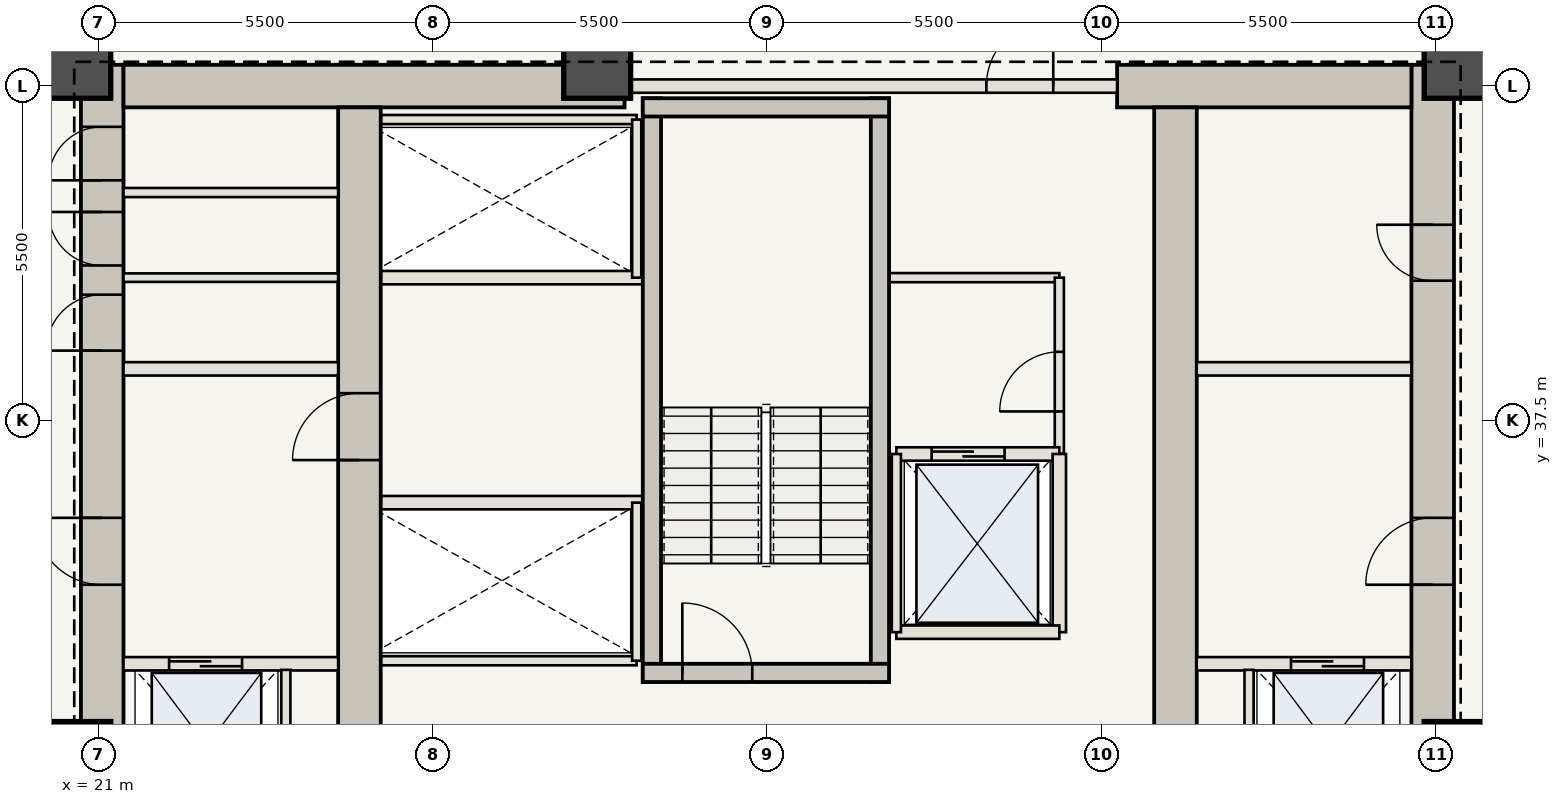
"""IFC4 building model, lengths in metres.
Left out: names, types, materials, properties, quantities, classifications, styles, units other than length and angle.
Written with IfcOpenShell. Run it as: python <this file> out.ifc"""

import sys

from ifc_helpers import new_model, si_unit, direction, frame, frame_2d, origin, origin_2d, place, context, subcontext, project, spatial, rectangle, extrude, element, fill, save


model = new_model("IFC4")
c1 = context("Model", 3, precision=1e-05, world=origin(), true_north=direction((0.0, 1.0)))
c2 = subcontext(c1, "Body", "Model", "MODEL_VIEW")
j1 = project(units=[si_unit("LENGTHUNIT", "METRE"), si_unit("PLANEANGLEUNIT", "RADIAN")], contexts=[c1])
p1 = place(None, origin())
s1 = spatial("IfcSite", under=j1, at=p1, CompositionType="ELEMENT")
p2 = place(p1, origin())
s2 = spatial("IfcBuilding", under=s1, at=p2, CompositionType="ELEMENT")
p3 = place(p2, frame((0.0, 0.0, 66.85)))
s3 = spatial("IfcBuildingStorey", under=s2, at=p3, CompositionType="ELEMENT", Elevation=66.85)
p4 = place(p3, frame((21.06, 30.6, 0.0), z_axis=(0.0, 0.0, 1.0), x_axis=(0.0, 1.0, 0.0)))
e1 = element("IfcWall", 1, at=p4, inside=s3, PredefinedType="SHEAR", context=c2, shape_type="SweptSolid", body=[
    extrude(rectangle(XDim=12.75, YDim=0.7, at=frame_2d((6.375, 0.0))), origin(), (0.0, 0.0, 1.0), 3.5),
])
p5 = place(p4, frame((4.2, 0.0, 0.0)))
e2 = element("IfcOpeningElement", 2, at=p5, cuts=e1, PredefinedType="OPENING", context=c2, shape_type="SweptSolid", body=[
    extrude(rectangle(XDim=1.1, YDim=2.15, at=frame_2d((0.55, 1.075))), frame((0.0, 0.36, 0.0), z_axis=(0.0, -1.0, 0.0), x_axis=(1.0, 0.0, 0.0)), (0.0, 0.0, 1.0), 0.72),
])
p6 = place(p4, frame((8.05, 0.0, 0.0)))
e3 = element("IfcOpeningElement", 3, at=p6, cuts=e1, PredefinedType="OPENING", context=c2, shape_type="SweptSolid", body=[
    extrude(rectangle(XDim=0.92, YDim=2.1, at=frame_2d((0.46, 1.05))), frame((0.0, 0.36, 0.0), z_axis=(0.0, -1.0, 0.0), x_axis=(1.0, 0.0, 0.0)), (0.0, 0.0, 1.0), 0.72),
])
p7 = place(p4, frame((9.45, 0.0, 0.0)))
e4 = element("IfcOpeningElement", 4, at=p7, cuts=e1, PredefinedType="OPENING", context=c2, shape_type="SweptSolid", body=[
    extrude(rectangle(XDim=0.88, YDim=2.1, at=frame_2d((0.44, 1.05))), frame((0.0, 0.36, 0.0), z_axis=(0.0, -1.0, 0.0), x_axis=(1.0, 0.0, 0.0)), (0.0, 0.0, 1.0), 0.72),
])
p8 = place(p4, frame((10.85, 0.0, 0.0)))
e5 = element("IfcOpeningElement", 5, at=p8, cuts=e1, PredefinedType="OPENING", context=c2, shape_type="SweptSolid", body=[
    extrude(rectangle(XDim=0.88, YDim=2.1, at=frame_2d((0.44, 1.05))), frame((0.0, 0.36, 0.0), z_axis=(0.0, -1.0, 0.0), x_axis=(1.0, 0.0, 0.0)), (0.0, 0.0, 1.0), 0.72),
])
p9 = place(p3, frame((42.94, 30.6, 0.0), z_axis=(0.0, 0.0, 1.0), x_axis=(0.0, 1.0, 0.0)))
e6 = element("IfcWall", 6, at=p9, inside=s3, PredefinedType="SHEAR", context=c2, shape_type="SweptSolid", body=[
    extrude(rectangle(XDim=12.75, YDim=0.7, at=frame_2d((6.375, 0.0))), origin(), (0.0, 0.0, 1.0), 3.5),
])
p10 = place(p9, frame((4.2, 0.0, 0.0)))
e7 = element("IfcOpeningElement", 7, at=p10, cuts=e6, PredefinedType="OPENING", context=c2, shape_type="SweptSolid", body=[
    extrude(rectangle(XDim=1.1, YDim=2.15, at=frame_2d((0.55, 1.075))), frame((0.0, 0.36, 0.0), z_axis=(0.0, -1.0, 0.0), x_axis=(1.0, 0.0, 0.0)), (0.0, 0.0, 1.0), 0.72),
])
p11 = place(p9, frame((9.2, 0.0, 0.0)))
e8 = element("IfcOpeningElement", 8, at=p11, cuts=e6, PredefinedType="OPENING", context=c2, shape_type="SweptSolid", body=[
    extrude(rectangle(XDim=0.92, YDim=2.1, at=frame_2d((0.46, 1.05))), frame((0.0, 0.36, 0.0), z_axis=(0.0, -1.0, 0.0), x_axis=(1.0, 0.0, 0.0)), (0.0, 0.0, 1.0), 0.72),
])
p12 = place(p3, frame((21.41, 43.0, 0.0), z_axis=(0.0, 0.0, 1.0), x_axis=(1.0, 0.0, 0.0)))
e9 = element("IfcWall", 9, at=p12, inside=s3, PredefinedType="SHEAR", context=c2, shape_type="SweptSolid", body=[
    extrude(rectangle(XDim=8.24, YDim=0.7, at=frame_2d((4.12, 0.0))), origin(), (0.0, 0.0, 1.0), 3.5),
])
p13 = place(p3, frame((37.75, 43.0, 0.0), z_axis=(0.0, 0.0, 1.0), x_axis=(1.0, 0.0, 0.0)))
e10 = element("IfcWall", 10, at=p13, inside=s3, PredefinedType="SHEAR", context=c2, shape_type="SweptSolid", body=[
    extrude(rectangle(XDim=4.84, YDim=0.7, at=frame_2d((2.42, 0.0))), origin(), (0.0, 0.0, 1.0), 3.5),
])
p14 = place(p3, frame((25.29, 30.6, 0.0), z_axis=(0.0, 0.0, 1.0), x_axis=(0.0, 1.0, 0.0)))
e11 = element("IfcWall", 11, at=p14, inside=s3, PredefinedType="SHEAR", context=c2, shape_type="SweptSolid", body=[
    extrude(rectangle(XDim=12.05, YDim=0.7, at=frame_2d((6.025, 0.0))), origin(), (0.0, 0.0, 1.0), 3.5),
])
p15 = place(p14, frame((6.25, 0.0, 0.0)))
e12 = element("IfcOpeningElement", 12, at=p15, cuts=e11, PredefinedType="OPENING", context=c2, shape_type="SweptSolid", body=[
    extrude(rectangle(XDim=1.1, YDim=2.15, at=frame_2d((0.55, 1.075))), frame((0.0, 0.36, 0.0), z_axis=(0.0, -1.0, 0.0), x_axis=(1.0, 0.0, 0.0)), (0.0, 0.0, 1.0), 0.72),
])
p16 = place(p3, frame((38.71, 30.6, 0.0), z_axis=(0.0, 0.0, 1.0), x_axis=(0.0, 1.0, 0.0)))
e13 = element("IfcWall", 13, at=p16, inside=s3, PredefinedType="SHEAR", context=c2, shape_type="SweptSolid", body=[
    extrude(rectangle(XDim=12.05, YDim=0.7, at=frame_2d((6.025, 0.0))), origin(), (0.0, 0.0, 1.0), 3.5),
])
for number, where, z_axis, x_axis in (
    (14, (43.35, 32.0, 0.0), (0.0, 0.0, 1.0), (1.0, 0.0, 0.0)),
    (15, (43.35, 43.35, 0.0), (0.0, 0.0, 1.0), (1.0, 0.0, 0.0)),
    (16, (29.2, 43.35, 0.0), (0.0, 0.0, 1.0), (1.0, 0.0, 0.0)),
    (17, (20.65, 43.35, 0.0), (0.0, 0.0, 1.0), (1.0, 0.0, 0.0)),
    (18, (20.65, 32.0, 0.0), (0.0, 0.0, 1.0), (1.0, 0.0, 0.0)),
):
    element("IfcColumn", number, at=place(p3, frame(where, z_axis=z_axis, x_axis=x_axis)), inside=s3, PredefinedType="COLUMN", context=c2, shape_type="SweptSolid", body=[
        extrude(rectangle(XDim=1.1, YDim=1.1, at=origin_2d()), origin(), (0.0, 0.0, 1.0), 3.5),
    ])
p17 = place(p3, frame((21.41, 33.5, 0.0), z_axis=(0.0, 0.0, 1.0), x_axis=(1.0, 0.0, 0.0)))
e19 = element("IfcWall", 19, at=p17, inside=s3, PredefinedType="STANDARD", context=c2, shape_type="SweptSolid", body=[
    extrude(rectangle(XDim=3.53, YDim=0.22, at=frame_2d((1.765, 0.0))), origin(), (0.0, 0.0, 1.0), 3.32),
])
p18 = place(p17, frame((0.75, 0.0, 0.0)))
e20 = element("IfcOpeningElement", 20, at=p18, cuts=e19, PredefinedType="OPENING", context=c2, shape_type="SweptSolid", body=[
    extrude(rectangle(XDim=1.2, YDim=2.2, at=frame_2d((0.6, 1.1))), frame((0.0, 0.12, 0.0), z_axis=(0.0, -1.0, 0.0), x_axis=(1.0, 0.0, 0.0)), (0.0, 0.0, 1.0), 0.24),
])
p19 = place(p3, frame((24.08, 30.75, 0.0), z_axis=(0.0, 0.0, 1.0), x_axis=(0.0, 1.0, 0.0)))
e21 = element("IfcWall", 21, at=p19, inside=s3, PredefinedType="STANDARD", context=c2, shape_type="SweptSolid", body=[
    extrude(rectangle(XDim=2.65, YDim=0.15, at=frame_2d((1.325, 0.0))), origin(), (0.0, 0.0, 1.0), 3.32),
])
p20 = place(p3, frame((39.06, 33.5, 0.0), z_axis=(0.0, 0.0, 1.0), x_axis=(1.0, 0.0, 0.0)))
e22 = element("IfcWall", 22, at=p20, inside=s3, PredefinedType="STANDARD", context=c2, shape_type="SweptSolid", body=[
    extrude(rectangle(XDim=3.53, YDim=0.22, at=frame_2d((1.765, 0.0))), origin(), (0.0, 0.0, 1.0), 3.32),
])
p21 = place(p20, frame((1.55, 0.0, 0.0)))
e23 = element("IfcOpeningElement", 23, at=p21, cuts=e22, PredefinedType="OPENING", context=c2, shape_type="SweptSolid", body=[
    extrude(rectangle(XDim=1.2, YDim=2.2, at=frame_2d((0.6, 1.1))), frame((0.0, 0.12, 0.0), z_axis=(0.0, -1.0, 0.0), x_axis=(1.0, 0.0, 0.0)), (0.0, 0.0, 1.0), 0.24),
])
p22 = place(p3, frame((39.92, 30.75, 0.0), z_axis=(0.0, 0.0, 1.0), x_axis=(0.0, 1.0, 0.0)))
e24 = element("IfcWall", 24, at=p22, inside=s3, PredefinedType="STANDARD", context=c2, shape_type="SweptSolid", body=[
    extrude(rectangle(XDim=2.65, YDim=0.15, at=frame_2d((1.325, 0.0))), origin(), (0.0, 0.0, 1.0), 3.32),
])
for number, where, z_axis, x_axis in (
    (25, (21.41, 38.35, 0.0), (0.0, 0.0, 1.0), (1.0, 0.0, 0.0)),
    (26, (39.06, 38.35, 0.0), (0.0, 0.0, 1.0), (1.0, 0.0, 0.0)),
):
    element("IfcWall", number, at=place(p3, frame(where, z_axis=z_axis, x_axis=x_axis)), inside=s3, PredefinedType="STANDARD", context=c2, shape_type="SweptSolid", body=[
        extrude(rectangle(XDim=3.53, YDim=0.22, at=frame_2d((1.765, 0.0))), origin(), (0.0, 0.0, 1.0), 3.32),
    ])
p23 = place(p3, frame((21.41, 39.85, 0.0), z_axis=(0.0, 0.0, 1.0), x_axis=(1.0, 0.0, 0.0)))
e27 = element("IfcWall", 27, at=p23, inside=s3, PredefinedType="STANDARD", context=c2, shape_type="SweptSolid", body=[
    extrude(rectangle(XDim=3.53, YDim=0.14, at=frame_2d((1.765, 0.0))), origin(), (0.0, 0.0, 1.0), 3.32),
])
p24 = place(p3, frame((21.41, 41.25, 0.0), z_axis=(0.0, 0.0, 1.0), x_axis=(1.0, 0.0, 0.0)))
e28 = element("IfcWall", 28, at=p24, inside=s3, PredefinedType="STANDARD", context=c2, shape_type="SweptSolid", body=[
    extrude(rectangle(XDim=3.53, YDim=0.15, at=frame_2d((1.765, 0.0))), origin(), (0.0, 0.0, 1.0), 3.32),
])
p25 = place(p3, frame((34.0, 39.85, 0.0), z_axis=(0.0, 0.0, 1.0), x_axis=(1.0, 0.0, 0.0)))
e29 = element("IfcWall", 29, at=p25, inside=s3, PredefinedType="STANDARD", context=c2, shape_type="SweptSolid", body=[
    extrude(rectangle(XDim=2.8, YDim=0.15, at=frame_2d((1.4, 0.0))), origin(), (0.0, 0.0, 1.0), 3.32),
])
p26 = place(p3, frame((36.8, 36.95, 0.0), z_axis=(0.0, 0.0, 1.0), x_axis=(0.0, 1.0, 0.0)))
e30 = element("IfcWall", 30, at=p26, inside=s3, PredefinedType="STANDARD", context=c2, shape_type="SweptSolid", body=[
    extrude(rectangle(XDim=2.9, YDim=0.15, at=frame_2d((1.45, 0.0))), origin(), (0.0, 0.0, 1.0), 3.32),
])
p27 = place(p26, frame((0.7, 0.0, 0.0)))
e31 = element("IfcOpeningElement", 31, at=p27, cuts=e30, PredefinedType="OPENING", context=c2, shape_type="SweptSolid", body=[
    extrude(rectangle(XDim=0.98, YDim=2.2, at=frame_2d((0.49, 1.1))), frame((0.0, 0.085, 0.0), z_axis=(0.0, -1.0, 0.0), x_axis=(1.0, 0.0, 0.0)), (0.0, 0.0, 1.0), 0.17),
])
p28 = place(p3, frame((25.65, 36.15, 0.0), z_axis=(0.0, 0.0, 1.0), x_axis=(1.0, 0.0, 0.0)))
e32 = element("IfcWall", 32, at=p28, inside=s3, PredefinedType="STANDARD", context=c2, shape_type="SweptSolid", body=[
    extrude(rectangle(XDim=4.3, YDim=0.22, at=frame_2d((2.15, 0.0))), origin(), (0.0, 0.0, 1.0), 3.32),
])
p29 = place(p3, frame((25.65, 33.55, 0.0), z_axis=(0.0, 0.0, 1.0), x_axis=(1.0, 0.0, 0.0)))
e33 = element("IfcWall", 33, at=p29, inside=s3, PredefinedType="STANDARD", context=c2, shape_type="SweptSolid", body=[
    extrude(rectangle(XDim=4.2, YDim=0.15, at=frame_2d((2.1, 0.0))), origin(), (0.0, 0.0, 1.0), 3.32),
])
p30 = place(p3, frame((29.85, 33.55, 0.0), z_axis=(0.0, 0.0, 1.0), x_axis=(0.0, 1.0, 0.0)))
e34 = element("IfcWall", 34, at=p30, inside=s3, PredefinedType="STANDARD", context=c2, shape_type="SweptSolid", body=[
    extrude(rectangle(XDim=2.6, YDim=0.15, at=frame_2d((1.3, 0.0))), origin(), (0.0, 0.0, 1.0), 3.32),
])
p31 = place(p3, frame((25.65, 39.85, 0.0), z_axis=(0.0, 0.0, 1.0), x_axis=(1.0, 0.0, 0.0)))
e35 = element("IfcWall", 35, at=p31, inside=s3, PredefinedType="STANDARD", context=c2, shape_type="SweptSolid", body=[
    extrude(rectangle(XDim=4.3, YDim=0.22, at=frame_2d((2.15, 0.0))), origin(), (0.0, 0.0, 1.0), 3.32),
])
p32 = place(p3, frame((25.65, 42.45, 0.0), z_axis=(0.0, 0.0, 1.0), x_axis=(1.0, 0.0, 0.0)))
e36 = element("IfcWall", 36, at=p32, inside=s3, PredefinedType="STANDARD", context=c2, shape_type="SweptSolid", body=[
    extrude(rectangle(XDim=4.2, YDim=0.15, at=frame_2d((2.1, 0.0))), origin(), (0.0, 0.0, 1.0), 3.32),
])
p33 = place(p3, frame((29.85, 39.85, 0.0), z_axis=(0.0, 0.0, 1.0), x_axis=(0.0, 1.0, 0.0)))
e37 = element("IfcWall", 37, at=p33, inside=s3, PredefinedType="STANDARD", context=c2, shape_type="SweptSolid", body=[
    extrude(rectangle(XDim=2.6, YDim=0.15, at=frame_2d((1.3, 0.0))), origin(), (0.0, 0.0, 1.0), 3.32),
])
for number, where, z_axis, x_axis in (
    (38, (30.1, 33.2, 0.0), (0.0, 0.0, 1.0), (0.0, 1.0, 0.0)),
    (39, (33.85, 33.2, 0.0), (0.0, 0.0, 1.0), (0.0, 1.0, 0.0)),
):
    element("IfcWall", number, at=place(p3, frame(where, z_axis=z_axis, x_axis=x_axis)), inside=s3, PredefinedType="SHEAR", context=c2, shape_type="SweptSolid", body=[
        extrude(rectangle(XDim=9.6, YDim=0.3, at=frame_2d((4.8, 0.0))), origin(), (0.0, 0.0, 1.0), 3.32),
    ])
p34 = place(p3, frame((29.95, 33.35, 0.0), z_axis=(0.0, 0.0, 1.0), x_axis=(1.0, 0.0, 0.0)))
e40 = element("IfcWall", 40, at=p34, inside=s3, PredefinedType="SHEAR", context=c2, shape_type="SweptSolid", body=[
    extrude(rectangle(XDim=4.05, YDim=0.3, at=frame_2d((2.025, 0.0))), origin(), (0.0, 0.0, 1.0), 3.32),
])
p35 = place(p34, frame((0.65, 0.0, 0.0)))
e41 = element("IfcOpeningElement", 41, at=p35, cuts=e40, PredefinedType="OPENING", context=c2, shape_type="SweptSolid", body=[
    extrude(rectangle(XDim=1.15, YDim=2.15, at=frame_2d((0.575, 1.075))), frame((0.0, 0.16, 0.0), z_axis=(0.0, -1.0, 0.0), x_axis=(1.0, 0.0, 0.0)), (0.0, 0.0, 1.0), 0.32),
])
p36 = place(p3, frame((29.95, 42.65, 0.0), z_axis=(0.0, 0.0, 1.0), x_axis=(1.0, 0.0, 0.0)))
e42 = element("IfcWall", 42, at=p36, inside=s3, PredefinedType="SHEAR", context=c2, shape_type="SweptSolid", body=[
    extrude(rectangle(XDim=4.05, YDim=0.3, at=frame_2d((2.025, 0.0))), origin(), (0.0, 0.0, 1.0), 3.32),
])
p37 = place(p3, frame((29.65, 43.0, 0.0), z_axis=(0.0, 0.0, 1.0), x_axis=(1.0, 0.0, 0.0)))
e43 = element("IfcWall", 43, at=p37, inside=s3, PredefinedType="STANDARD", context=c2, shape_type="SweptSolid", body=[
    extrude(rectangle(XDim=8.1, YDim=0.22, at=frame_2d((4.05, 0.0))), origin(), (0.0, 0.0, 1.0), 3.32),
])
p38 = place(p37, frame((5.95, 0.0, 0.0)))
e44 = element("IfcOpeningElement", 44, at=p38, cuts=e43, PredefinedType="OPENING", context=c2, shape_type="SweptSolid", body=[
    extrude(rectangle(XDim=1.1, YDim=2.15, at=frame_2d((0.55, 1.075))), frame((0.0, 0.12, 0.0), z_axis=(0.0, -1.0, 0.0), x_axis=(1.0, 0.0, 0.0)), (0.0, 0.0, 1.0), 0.24),
])
p39 = place(p3, frame((34.12, 36.95, 0.0), z_axis=(0.0, 0.0, 1.0), x_axis=(1.0, 0.0, 0.0)))
e45 = element("IfcWall", 45, at=p39, inside=s3, PredefinedType="STANDARD", context=c2, shape_type="SweptSolid", body=[
    extrude(rectangle(XDim=2.68, YDim=0.22, at=frame_2d((1.34, 0.0))), origin(), (0.0, 0.0, 1.0), 3.32),
])
p40 = place(p39, frame((0.58, 0.0, 0.0)))
e46 = element("IfcOpeningElement", 46, at=p40, cuts=e45, PredefinedType="OPENING", context=c2, shape_type="SweptSolid", body=[
    extrude(rectangle(XDim=1.2, YDim=2.2, at=frame_2d((0.6, 1.1))), frame((0.0, 0.12, 0.0), z_axis=(0.0, -1.0, 0.0), x_axis=(1.0, 0.0, 0.0)), (0.0, 0.0, 1.0), 0.24),
])
p41 = place(p3, frame((36.8, 34.02, 0.0), z_axis=(0.0, 0.0, 1.0), x_axis=(0.0, 1.0, 0.0)))
e47 = element("IfcWall", 47, at=p41, inside=s3, PredefinedType="STANDARD", context=c2, shape_type="SweptSolid", body=[
    extrude(rectangle(XDim=2.93, YDim=0.22, at=frame_2d((1.465, 0.0))), origin(), (0.0, 0.0, 1.0), 3.32),
])
p42 = place(p3, frame((34.12, 34.02, 0.0), z_axis=(0.0, 0.0, 1.0), x_axis=(1.0, 0.0, 0.0)))
e48 = element("IfcWall", 48, at=p42, inside=s3, PredefinedType="STANDARD", context=c2, shape_type="SweptSolid", body=[
    extrude(rectangle(XDim=2.68, YDim=0.22, at=frame_2d((1.34, 0.0))), origin(), (0.0, 0.0, 1.0), 3.32),
])
p43 = place(p3, frame((34.12, 34.02, 0.0), z_axis=(0.0, 0.0, 1.0), x_axis=(0.0, 1.0, 0.0)))
e49 = element("IfcWall", 49, at=p43, inside=s3, PredefinedType="STANDARD", context=c2, shape_type="SweptSolid", body=[
    extrude(rectangle(XDim=2.93, YDim=0.15, at=frame_2d((1.465, 0.0))), origin(), (0.0, 0.0, 1.0), 3.32),
])
p44 = place(p5, origin())
e50 = element("IfcDoor", 50, at=p44, inside=s3, OperationType="SINGLE_SWING_RIGHT", PredefinedType="DOOR", context=c2, shape_type="SweptSolid", body=[
    extrude(rectangle(XDim=1.1, YDim=2.15, at=frame_2d((0.55, 1.075))), frame((0.0, 0.025, 0.0), z_axis=(0.0, -1.0, 0.0), x_axis=(1.0, 0.0, 0.0)), (0.0, 0.0, 1.0), 0.05),
])
fill(e2, e50)
p45 = place(p10, origin())
e51 = element("IfcDoor", 51, at=p45, inside=s3, OperationType="SINGLE_SWING_LEFT", PredefinedType="DOOR", context=c2, shape_type="SweptSolid", body=[
    extrude(rectangle(XDim=1.1, YDim=2.15, at=frame_2d((0.55, 1.075))), frame((0.0, 0.025, 0.0), z_axis=(0.0, -1.0, 0.0), x_axis=(1.0, 0.0, 0.0)), (0.0, 0.0, 1.0), 0.05),
])
fill(e7, e51)
p46 = place(p15, origin())
e52 = element("IfcDoor", 52, at=p46, inside=s3, OperationType="SINGLE_SWING_LEFT", PredefinedType="DOOR", context=c2, shape_type="SweptSolid", body=[
    extrude(rectangle(XDim=1.1, YDim=2.15, at=frame_2d((0.55, 1.075))), frame((0.0, 0.025, 0.0), z_axis=(0.0, -1.0, 0.0), x_axis=(1.0, 0.0, 0.0)), (0.0, 0.0, 1.0), 0.05),
])
fill(e12, e52)
p47 = place(p6, origin())
e53 = element("IfcDoor", 53, at=p47, inside=s3, OperationType="SINGLE_SWING_LEFT", PredefinedType="DOOR", context=c2, shape_type="SweptSolid", body=[
    extrude(rectangle(XDim=0.92, YDim=2.1, at=frame_2d((0.46, 1.05))), frame((0.0, 0.025, 0.0), z_axis=(0.0, -1.0, 0.0), x_axis=(1.0, 0.0, 0.0)), (0.0, 0.0, 1.0), 0.05),
])
fill(e3, e53)
p48 = place(p7, origin())
e54 = element("IfcDoor", 54, at=p48, inside=s3, OperationType="SINGLE_SWING_RIGHT", PredefinedType="DOOR", context=c2, shape_type="SweptSolid", body=[
    extrude(rectangle(XDim=0.88, YDim=2.1, at=frame_2d((0.44, 1.05))), frame((0.0, 0.025, 0.0), z_axis=(0.0, -1.0, 0.0), x_axis=(1.0, 0.0, 0.0)), (0.0, 0.0, 1.0), 0.05),
])
fill(e4, e54)
p49 = place(p8, origin())
e55 = element("IfcDoor", 55, at=p49, inside=s3, OperationType="SINGLE_SWING_LEFT", PredefinedType="DOOR", context=c2, shape_type="SweptSolid", body=[
    extrude(rectangle(XDim=0.88, YDim=2.1, at=frame_2d((0.44, 1.05))), frame((0.0, 0.025, 0.0), z_axis=(0.0, -1.0, 0.0), x_axis=(1.0, 0.0, 0.0)), (0.0, 0.0, 1.0), 0.05),
])
fill(e5, e55)
p50 = place(p11, origin())
e56 = element("IfcDoor", 56, at=p50, inside=s3, OperationType="SINGLE_SWING_RIGHT", PredefinedType="DOOR", context=c2, shape_type="SweptSolid", body=[
    extrude(rectangle(XDim=0.92, YDim=2.1, at=frame_2d((0.46, 1.05))), frame((0.0, 0.025, 0.0), z_axis=(0.0, -1.0, 0.0), x_axis=(1.0, 0.0, 0.0)), (0.0, 0.0, 1.0), 0.05),
])
fill(e8, e56)
p51 = place(p18, origin())
e57 = element("IfcDoor", 57, at=p51, inside=s3, OperationType="DOUBLE_DOOR_SLIDING", PredefinedType="DOOR", context=c2, shape_type="SweptSolid", body=[
    extrude(rectangle(XDim=1.2, YDim=2.2, at=frame_2d((0.6, 1.1))), frame((0.0, 0.025, 0.0), z_axis=(0.0, -1.0, 0.0), x_axis=(1.0, 0.0, 0.0)), (0.0, 0.0, 1.0), 0.05),
])
fill(e20, e57)
p52 = place(p21, origin())
e58 = element("IfcDoor", 58, at=p52, inside=s3, OperationType="DOUBLE_DOOR_SLIDING", PredefinedType="DOOR", context=c2, shape_type="SweptSolid", body=[
    extrude(rectangle(XDim=1.2, YDim=2.2, at=frame_2d((0.6, 1.1))), frame((0.0, 0.025, 0.0), z_axis=(0.0, -1.0, 0.0), x_axis=(1.0, 0.0, 0.0)), (0.0, 0.0, 1.0), 0.05),
])
fill(e23, e58)
p53 = place(p27, origin())
e59 = element("IfcDoor", 59, at=p53, inside=s3, OperationType="SINGLE_SWING_LEFT", PredefinedType="DOOR", context=c2, shape_type="SweptSolid", body=[
    extrude(rectangle(XDim=0.98, YDim=2.2, at=frame_2d((0.49, 1.1))), frame((0.0, 0.025, 0.0), z_axis=(0.0, -1.0, 0.0), x_axis=(1.0, 0.0, 0.0)), (0.0, 0.0, 1.0), 0.05),
])
fill(e31, e59)
p54 = place(p35, origin())
e60 = element("IfcDoor", 60, at=p54, inside=s3, OperationType="SINGLE_SWING_LEFT", PredefinedType="DOOR", context=c2, shape_type="SweptSolid", body=[
    extrude(rectangle(XDim=1.15, YDim=2.15, at=frame_2d((0.575, 1.075))), frame((0.0, 0.025, 0.0), z_axis=(0.0, -1.0, 0.0), x_axis=(1.0, 0.0, 0.0)), (0.0, 0.0, 1.0), 0.05),
])
fill(e41, e60)
p55 = place(p38, origin())
e61 = element("IfcDoor", 61, at=p55, inside=s3, OperationType="SINGLE_SWING_RIGHT", PredefinedType="DOOR", context=c2, shape_type="SweptSolid", body=[
    extrude(rectangle(XDim=1.1, YDim=2.15, at=frame_2d((0.55, 1.075))), frame((0.0, 0.025, 0.0), z_axis=(0.0, -1.0, 0.0), x_axis=(1.0, 0.0, 0.0)), (0.0, 0.0, 1.0), 0.05),
])
fill(e44, e61)
p56 = place(p40, origin())
e62 = element("IfcDoor", 62, at=p56, inside=s3, OperationType="DOUBLE_DOOR_SLIDING", PredefinedType="DOOR", context=c2, shape_type="SweptSolid", body=[
    extrude(rectangle(XDim=1.2, YDim=2.2, at=frame_2d((0.6, 1.1))), frame((0.0, 0.025, 0.0), z_axis=(0.0, -1.0, 0.0), x_axis=(1.0, 0.0, 0.0)), (0.0, 0.0, 1.0), 0.05),
])
fill(e46, e62)
save(model, sys.argv[1])
